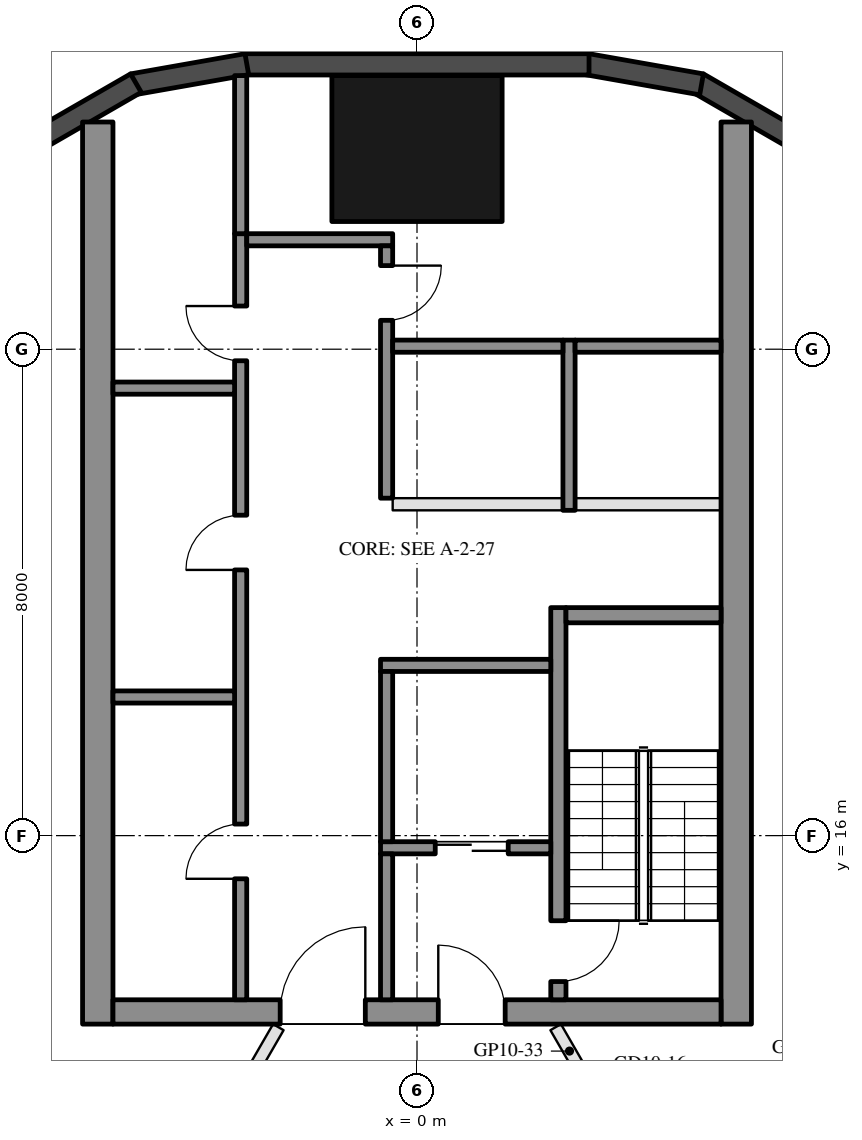
"""IFC4 building model, lengths in metres.
Left out: names, types, materials, properties, quantities, classifications, styles, units other than length and angle.
Written with IfcOpenShell. Run it as: python <this file> out.ifc"""

import sys

from ifc_helpers import new_model, si_unit, direction, frame, frame_2d, origin, origin_2d, place, context, subcontext, project, spatial, rectangle, hollow_rectangle, extrude, element, fill, save


model = new_model("IFC4")
c1 = context("Model", 3, precision=1e-05, world=origin(), true_north=direction((0.0, 1.0)))
c2 = subcontext(c1, "Body", "Model", "MODEL_VIEW")
j1 = project(units=[si_unit("LENGTHUNIT", "METRE"), si_unit("PLANEANGLEUNIT", "RADIAN")], contexts=[c1])
p1 = place(None, origin())
s1 = spatial("IfcSite", under=j1, at=p1, CompositionType="ELEMENT")
p2 = place(p1, origin())
s2 = spatial("IfcBuilding", under=s1, at=p2, CompositionType="ELEMENT")
p3 = place(p2, frame((0.0, 0.0, 120.5)))
s3 = spatial("IfcBuildingStorey", under=s2, at=p3, CompositionType="ELEMENT", Elevation=120.5)
p4 = place(p3, frame((0.0, 27.3, 0.0), z_axis=(0.0, 0.0, 1.0), x_axis=(1.0, 0.0, 0.0)))
e1 = element("IfcColumn", 1, at=p4, inside=s3, PredefinedType="COLUMN", context=c2, shape_type="SweptSolid", body=[
    extrude(hollow_rectangle(XDim=2.8, YDim=2.4, WallThickness=0.07, at=origin_2d()), origin(), (0.0, 0.0, 1.0), 3.7),
])
for number, where, z_axis, x_axis in (
    (2, (6.277, 27.422, 0.0), (0.0, 0.0, 1.0), (-0.866, 0.5, 0.0)),
    (3, (4.68, 28.356, 0.0), (0.0, 0.0, 1.0), (-0.985, 0.174, 0.0)),
):
    element("IfcWall", number, at=place(p3, frame(where, z_axis=z_axis, x_axis=x_axis)), inside=s3, PredefinedType="SOLIDWALL", context=c2, shape_type="SweptSolid", body=[
        extrude(rectangle(XDim=1.91, YDim=0.35, at=frame_2d((0.955, 0.0))), origin(), (0.0, 0.0, 1.0), 3.55),
    ])
p5 = place(p3, frame((2.829, 28.685, 0.0), z_axis=(0.0, 0.0, 1.0), x_axis=(-1.0, 0.0, 0.0)))
e4 = element("IfcWall", 4, at=p5, inside=s3, PredefinedType="SOLIDWALL", context=c2, shape_type="SweptSolid", body=[
    extrude(rectangle(XDim=5.658, YDim=0.35, at=frame_2d((2.829, 0.0))), origin(), (0.0, 0.0, 1.0), 3.55),
])
for number, where, z_axis, x_axis in (
    (5, (-2.799, 28.688, 0.0), (0.0, 0.0, 1.0), (-0.985, -0.174, 0.0)),
    (6, (-4.623, 28.377, 0.0), (0.0, 0.0, 1.0), (-0.866, -0.5, 0.0)),
):
    element("IfcWall", number, at=place(p3, frame(where, z_axis=z_axis, x_axis=x_axis)), inside=s3, PredefinedType="SOLIDWALL", context=c2, shape_type="SweptSolid", body=[
        extrude(rectangle(XDim=1.91, YDim=0.35, at=frame_2d((0.955, 0.0))), origin(), (0.0, 0.0, 1.0), 3.55),
    ])
for number, where, z_axis, x_axis in (
    (7, (5.25, 12.9, 0.0), (0.0, 0.0, 1.0), (0.0, 1.0, 0.0)),
    (8, (-5.25, 12.9, 0.0), (0.0, 0.0, 1.0), (0.0, 1.0, 0.0)),
):
    element("IfcWall", number, at=place(p3, frame(where, z_axis=z_axis, x_axis=x_axis)), inside=s3, PredefinedType="SHEAR", context=c2, shape_type="SweptSolid", body=[
        extrude(rectangle(XDim=14.837, YDim=0.5, at=frame_2d((7.418, 0.0))), origin(), (0.0, 0.0, 1.0), 3.5),
    ])
p6 = place(p3, frame((5.0, 13.1, 0.0), z_axis=(0.0, 0.0, 1.0), x_axis=(-1.0, 0.0, 0.0)))
e9 = element("IfcWall", 9, at=p6, inside=s3, PredefinedType="SHEAR", context=c2, shape_type="SweptSolid", body=[
    extrude(rectangle(XDim=10.0, YDim=0.4, at=frame_2d((5.0, 0.0))), origin(), (0.0, 0.0, 1.0), 3.5),
])
p7 = place(p6, frame((3.55, 0.0, 0.0)))
e10 = element("IfcOpeningElement", 10, at=p7, cuts=e9, PredefinedType="OPENING", context=c2, shape_type="SweptSolid", body=[
    extrude(rectangle(XDim=1.1, YDim=2.1, at=frame_2d((0.55, 1.05))), frame((0.0, 0.21, 0.0), z_axis=(0.0, -1.0, 0.0), x_axis=(1.0, 0.0, 0.0)), (0.0, 0.0, 1.0), 0.42),
])
p8 = place(p6, frame((5.85, 0.0, 0.0)))
e11 = element("IfcOpeningElement", 11, at=p8, cuts=e9, PredefinedType="OPENING", context=c2, shape_type="SweptSolid", body=[
    extrude(rectangle(XDim=1.4, YDim=2.1, at=frame_2d((0.7, 1.05))), frame((0.0, 0.21, 0.0), z_axis=(0.0, -1.0, 0.0), x_axis=(1.0, 0.0, 0.0)), (0.0, 0.0, 1.0), 0.42),
])
p9 = place(p3, frame((2.325, 13.3, 0.0), z_axis=(0.0, 0.0, 1.0), x_axis=(0.0, 1.0, 0.0)))
e12 = element("IfcWall", 12, at=p9, inside=s3, PredefinedType="SHEAR", context=c2, shape_type="SweptSolid", body=[
    extrude(rectangle(XDim=6.45, YDim=0.25, at=frame_2d((3.225, 0.0))), origin(), (0.0, 0.0, 1.0), 3.5),
])
p10 = place(p9, frame((0.3, 0.0, 0.0)))
e13 = element("IfcOpeningElement", 13, at=p10, cuts=e12, PredefinedType="OPENING", context=c2, shape_type="SweptSolid", body=[
    extrude(rectangle(XDim=1.0, YDim=2.1, at=frame_2d((0.5, 1.05))), frame((0.0, 0.135, 0.0), z_axis=(0.0, -1.0, 0.0), x_axis=(1.0, 0.0, 0.0)), (0.0, 0.0, 1.0), 0.27),
])
p11 = place(p3, frame((5.0, 19.625, 0.0), z_axis=(0.0, 0.0, 1.0), x_axis=(-1.0, 0.0, 0.0)))
e14 = element("IfcWall", 14, at=p11, inside=s3, PredefinedType="SHEAR", context=c2, shape_type="SweptSolid", body=[
    extrude(rectangle(XDim=2.55, YDim=0.25, at=frame_2d((1.275, 0.0))), origin(), (0.0, 0.0, 1.0), 3.5),
])
p12 = place(p3, frame((2.2, 18.8, 0.0), z_axis=(0.0, 0.0, 1.0), x_axis=(-1.0, 0.0, 0.0)))
e15 = element("IfcWall", 15, at=p12, inside=s3, PredefinedType="SHEAR", context=c2, shape_type="SweptSolid", body=[
    extrude(rectangle(XDim=2.8, YDim=0.2, at=frame_2d((1.4, 0.0))), origin(), (0.0, 0.0, 1.0), 3.5),
])
p13 = place(p3, frame((2.2, 15.8, 0.0), z_axis=(0.0, 0.0, 1.0), x_axis=(-1.0, 0.0, 0.0)))
e16 = element("IfcWall", 16, at=p13, inside=s3, PredefinedType="SHEAR", context=c2, shape_type="SweptSolid", body=[
    extrude(rectangle(XDim=2.8, YDim=0.2, at=frame_2d((1.4, 0.0))), origin(), (0.0, 0.0, 1.0), 3.5),
])
p14 = place(p13, frame((0.7, 0.0, 0.0)))
e17 = element("IfcOpeningElement", 17, at=p14, cuts=e16, PredefinedType="OPENING", context=c2, shape_type="SweptSolid", body=[
    extrude(rectangle(XDim=1.2, YDim=2.1, at=frame_2d((0.6, 1.05))), frame((0.0, 0.11, 0.0), z_axis=(0.0, -1.0, 0.0), x_axis=(1.0, 0.0, 0.0)), (0.0, 0.0, 1.0), 0.22),
])
p15 = place(p3, frame((-0.5, 15.9, 0.0), z_axis=(0.0, 0.0, 1.0), x_axis=(0.0, 1.0, 0.0)))
e18 = element("IfcWall", 18, at=p15, inside=s3, PredefinedType="SHEAR", context=c2, shape_type="SweptSolid", body=[
    extrude(rectangle(XDim=2.8, YDim=0.2, at=frame_2d((1.4, 0.0))), origin(), (0.0, 0.0, 1.0), 3.5),
])
p16 = place(p3, frame((-0.5, 13.3, 0.0), z_axis=(0.0, 0.0, 1.0), x_axis=(0.0, 1.0, 0.0)))
e19 = element("IfcWall", 19, at=p16, inside=s3, PredefinedType="SHEAR", context=c2, shape_type="SweptSolid", body=[
    extrude(rectangle(XDim=2.4, YDim=0.2, at=frame_2d((1.2, 0.0))), origin(), (0.0, 0.0, 1.0), 3.5),
])
p17 = place(p3, frame((-2.9, 13.3, 0.0), z_axis=(0.0, 0.0, 1.0), x_axis=(0.0, 1.0, 0.0)))
e20 = element("IfcWall", 20, at=p17, inside=s3, PredefinedType="SHEAR", context=c2, shape_type="SweptSolid", body=[
    extrude(rectangle(XDim=12.6, YDim=0.2, at=frame_2d((6.3, 0.0))), origin(), (0.0, 0.0, 1.0), 3.5),
])
p18 = place(p17, frame((1.99, 0.0, 0.0)))
e21 = element("IfcOpeningElement", 21, at=p18, cuts=e20, PredefinedType="OPENING", context=c2, shape_type="SweptSolid", body=[
    extrude(rectangle(XDim=0.9, YDim=2.1, at=frame_2d((0.45, 1.05))), frame((0.0, 0.11, 0.0), z_axis=(0.0, -1.0, 0.0), x_axis=(1.0, 0.0, 0.0)), (0.0, 0.0, 1.0), 0.22),
])
p19 = place(p17, frame((7.07, 0.0, 0.0)))
e22 = element("IfcOpeningElement", 22, at=p19, cuts=e20, PredefinedType="OPENING", context=c2, shape_type="SweptSolid", body=[
    extrude(rectangle(XDim=0.9, YDim=2.1, at=frame_2d((0.45, 1.05))), frame((0.0, 0.11, 0.0), z_axis=(0.0, -1.0, 0.0), x_axis=(1.0, 0.0, 0.0)), (0.0, 0.0, 1.0), 0.22),
])
p20 = place(p17, frame((10.51, 0.0, 0.0)))
e23 = element("IfcOpeningElement", 23, at=p20, cuts=e20, PredefinedType="OPENING", context=c2, shape_type="SweptSolid", body=[
    extrude(rectangle(XDim=0.9, YDim=2.1, at=frame_2d((0.45, 1.05))), frame((0.0, 0.11, 0.0), z_axis=(0.0, -1.0, 0.0), x_axis=(1.0, 0.0, 0.0)), (0.0, 0.0, 1.0), 0.22),
])
p21 = place(p3, frame((-0.4, 25.8, 0.0), z_axis=(0.0, 0.0, 1.0), x_axis=(-1.0, 0.0, 0.0)))
e24 = element("IfcWall", 24, at=p21, inside=s3, PredefinedType="SHEAR", context=c2, shape_type="SweptSolid", body=[
    extrude(rectangle(XDim=2.4, YDim=0.2, at=frame_2d((1.2, 0.0))), origin(), (0.0, 0.0, 1.0), 3.5),
])
p22 = place(p3, frame((-0.5, 21.55, 0.0), z_axis=(0.0, 0.0, 1.0), x_axis=(0.0, 1.0, 0.0)))
e25 = element("IfcWall", 25, at=p22, inside=s3, PredefinedType="SHEAR", context=c2, shape_type="SweptSolid", body=[
    extrude(rectangle(XDim=4.15, YDim=0.2, at=frame_2d((2.075, 0.0))), origin(), (0.0, 0.0, 1.0), 3.5),
])
p23 = place(p22, frame((2.925, 0.0, 0.0)))
e26 = element("IfcOpeningElement", 26, at=p23, cuts=e25, PredefinedType="OPENING", context=c2, shape_type="SweptSolid", body=[
    extrude(rectangle(XDim=0.9, YDim=2.1, at=frame_2d((0.45, 1.05))), frame((0.0, 0.11, 0.0), z_axis=(0.0, -1.0, 0.0), x_axis=(1.0, 0.0, 0.0)), (0.0, 0.0, 1.0), 0.22),
])
for number, where, z_axis, x_axis in (
    (27, (-3.0, 18.28, 0.0), (0.0, 0.0, 1.0), (-1.0, 0.0, 0.0)),
    (28, (-3.0, 23.36, 0.0), (0.0, 0.0, 1.0), (-1.0, 0.0, 0.0)),
):
    element("IfcWall", number, at=place(p3, frame(where, z_axis=z_axis, x_axis=x_axis)), inside=s3, PredefinedType="SHEAR", context=c2, shape_type="SweptSolid", body=[
        extrude(rectangle(XDim=2.0, YDim=0.2, at=frame_2d((1.0, 0.0))), origin(), (0.0, 0.0, 1.0), 3.5),
    ])
p24 = place(p3, frame((-2.9, 25.9, 0.0), z_axis=(0.0, 0.0, 1.0), x_axis=(0.0, 1.0, 0.0)))
e29 = element("IfcWall", 29, at=p24, inside=s3, PredefinedType="SHEAR", context=c2, shape_type="SweptSolid", body=[
    extrude(rectangle(XDim=2.6, YDim=0.2, at=frame_2d((1.3, 0.0))), origin(), (0.0, 0.0, 1.0), 3.5),
])
p25 = place(p3, frame((2.5, 21.35, 0.0), z_axis=(0.0, 0.0, 1.0), x_axis=(0.0, 1.0, 0.0)))
e30 = element("IfcWall", 30, at=p25, inside=s3, PredefinedType="SHEAR", context=c2, shape_type="SweptSolid", body=[
    extrude(rectangle(XDim=2.8, YDim=0.2, at=frame_2d((1.4, 0.0))), origin(), (0.0, 0.0, 1.0), 3.5),
])
p26 = place(p3, frame((5.0, 24.05, 0.0), z_axis=(0.0, 0.0, 1.0), x_axis=(-1.0, 0.0, 0.0)))
e31 = element("IfcWall", 31, at=p26, inside=s3, PredefinedType="SHEAR", context=c2, shape_type="SweptSolid", body=[
    extrude(rectangle(XDim=2.4, YDim=0.2, at=frame_2d((1.2, 0.0))), origin(), (0.0, 0.0, 1.0), 3.5),
])
p27 = place(p3, frame((2.4, 24.05, 0.0), z_axis=(0.0, 0.0, 1.0), x_axis=(-1.0, 0.0, 0.0)))
e32 = element("IfcWall", 32, at=p27, inside=s3, PredefinedType="SHEAR", context=c2, shape_type="SweptSolid", body=[
    extrude(rectangle(XDim=2.8, YDim=0.2, at=frame_2d((1.4, 0.0))), origin(), (0.0, 0.0, 1.0), 3.5),
])
p28 = place(p3, frame((5.0, 21.45, 0.0), z_axis=(0.0, 0.0, 1.0), x_axis=(-1.0, 0.0, 0.0)))
e33 = element("IfcWall", 33, at=p28, inside=s3, PredefinedType="PARTITIONING", context=c2, shape_type="SweptSolid", body=[
    extrude(rectangle(XDim=2.4, YDim=0.2, at=frame_2d((1.2, 0.0))), origin(), (0.0, 0.0, 1.0), 3.5),
])
p29 = place(p3, frame((2.4, 21.45, 0.0), z_axis=(0.0, 0.0, 1.0), x_axis=(-1.0, 0.0, 0.0)))
e34 = element("IfcWall", 34, at=p29, inside=s3, PredefinedType="PARTITIONING", context=c2, shape_type="SweptSolid", body=[
    extrude(rectangle(XDim=2.8, YDim=0.2, at=frame_2d((1.4, 0.0))), origin(), (0.0, 0.0, 1.0), 3.5),
])
p30 = place(p3, frame((13.647, 14.923, 0.0), z_axis=(0.0, 0.0, 1.0), x_axis=(-0.866027479907, -0.499996404033, 0.0)))
e35 = element("IfcWall", 35, at=p30, inside=s3, PredefinedType="PARTITIONING", context=c2, shape_type="SweptSolid", body=[
    extrude(rectangle(XDim=10.98, YDim=0.2, at=frame_2d((5.49, 0.0))), origin(), (0.0, 0.0, 1.0), 2.96),
])
p31 = place(p3, frame((-13.508, 13.363, 0.0), z_axis=(0.0, 0.0, 1.0), x_axis=(0.915297635711, -0.402778149932, 0.0)))
e36 = element("IfcWall", 36, at=p31, inside=s3, PredefinedType="PARTITIONING", context=c2, shape_type="SweptSolid", body=[
    extrude(rectangle(XDim=10.14, YDim=0.2, at=frame_2d((5.07, 0.0))), origin(), (0.0, 0.0, 1.0), 2.96),
])
p32 = place(p3, frame((14.522, 13.407, 0.0), z_axis=(0.0, 0.0, 1.0), x_axis=(-0.851781158383, -0.523897755506, 0.0)))
e37 = element("IfcWall", 37, at=p32, inside=s3, PredefinedType="PARTITIONING", context=c2, shape_type="SweptSolid", body=[
    extrude(rectangle(XDim=10.984, YDim=0.15, at=frame_2d((5.492, 0.0))), origin(), (0.0, 0.0, 1.0), 2.95),
])
p33 = place(p3, frame((2.281, 12.85, 0.0), z_axis=(0.0, 0.0, 1.0), x_axis=(0.499979074716, -0.866037484666, 0.0)))
e38 = element("IfcWall", 38, at=p33, inside=s3, PredefinedType="PARTITIONING", context=c2, shape_type="SweptSolid", body=[
    extrude(rectangle(XDim=3.788, YDim=0.2, at=frame_2d((1.894, 0.0))), origin(), (0.0, 0.0, 1.0), 2.95),
])
p34 = place(p33, frame((1.394, 0.0, 0.0)))
e39 = element("IfcOpeningElement", 39, at=p34, cuts=e38, PredefinedType="OPENING", context=c2, shape_type="SweptSolid", body=[
    extrude(rectangle(XDim=1.0, YDim=2.1, at=frame_2d((0.5, 1.05))), frame((0.0, 0.11, 0.0), z_axis=(0.0, -1.0, 0.0), x_axis=(1.0, 0.0, 0.0)), (0.0, 0.0, 1.0), 0.22),
])
p35 = place(p3, frame((-4.269, 9.406, 0.0), z_axis=(0.0, 0.0, 1.0), x_axis=(0.499968678846, 0.866043486306, 0.0)))
e40 = element("IfcWall", 40, at=p35, inside=s3, PredefinedType="PARTITIONING", context=c2, shape_type="SweptSolid", body=[
    extrude(rectangle(XDim=3.977, YDim=0.2, at=frame_2d((1.988, 0.0))), origin(), (0.0, 0.0, 1.0), 2.95),
])
p36 = place(p35, frame((1.488, 0.0, 0.0)))
e41 = element("IfcOpeningElement", 41, at=p36, cuts=e40, PredefinedType="OPENING", context=c2, shape_type="SweptSolid", body=[
    extrude(rectangle(XDim=1.0, YDim=2.1, at=frame_2d((0.5, 1.05))), frame((0.0, 0.11, 0.0), z_axis=(0.0, -1.0, 0.0), x_axis=(1.0, 0.0, 0.0)), (0.0, 0.0, 1.0), 0.22),
])
p37 = place(p14, origin())
e42 = element("IfcDoor", 42, at=p37, inside=s3, OperationType="DOUBLE_DOOR_SLIDING", PredefinedType="DOOR", context=c2, shape_type="SweptSolid", body=[
    extrude(rectangle(XDim=1.2, YDim=2.1, at=frame_2d((0.6, 1.05))), frame((0.0, 0.025, 0.0), z_axis=(0.0, -1.0, 0.0), x_axis=(1.0, 0.0, 0.0)), (0.0, 0.0, 1.0), 0.05),
])
fill(e17, e42)
p38 = place(p18, origin())
e43 = element("IfcDoor", 43, at=p38, inside=s3, OperationType="SINGLE_SWING_LEFT", PredefinedType="DOOR", context=c2, shape_type="SweptSolid", body=[
    extrude(rectangle(XDim=0.9, YDim=2.1, at=frame_2d((0.45, 1.05))), frame((0.0, 0.025, 0.0), z_axis=(0.0, -1.0, 0.0), x_axis=(1.0, 0.0, 0.0)), (0.0, 0.0, 1.0), 0.05),
])
fill(e21, e43)
p39 = place(p19, origin())
e44 = element("IfcDoor", 44, at=p39, inside=s3, OperationType="SINGLE_SWING_LEFT", PredefinedType="DOOR", context=c2, shape_type="SweptSolid", body=[
    extrude(rectangle(XDim=0.9, YDim=2.1, at=frame_2d((0.45, 1.05))), frame((0.0, 0.025, 0.0), z_axis=(0.0, -1.0, 0.0), x_axis=(1.0, 0.0, 0.0)), (0.0, 0.0, 1.0), 0.05),
])
fill(e22, e44)
p40 = place(p20, origin())
e45 = element("IfcDoor", 45, at=p40, inside=s3, OperationType="SINGLE_SWING_RIGHT", PredefinedType="DOOR", context=c2, shape_type="SweptSolid", body=[
    extrude(rectangle(XDim=0.9, YDim=2.1, at=frame_2d((0.45, 1.05))), frame((0.0, 0.025, 0.0), z_axis=(0.0, -1.0, 0.0), x_axis=(1.0, 0.0, 0.0)), (0.0, 0.0, 1.0), 0.05),
])
fill(e23, e45)
p41 = place(p23, frame((0.9, 0.0, 0.0), z_axis=(0.0, 0.0, 1.0), x_axis=(-1.0, 0.0, 0.0)))
e46 = element("IfcDoor", 46, at=p41, inside=s3, OperationType="SINGLE_SWING_LEFT", PredefinedType="DOOR", context=c2, shape_type="SweptSolid", body=[
    extrude(rectangle(XDim=0.9, YDim=2.1, at=frame_2d((0.45, 1.05))), frame((0.0, 0.025, 0.0), z_axis=(0.0, -1.0, 0.0), x_axis=(1.0, 0.0, 0.0)), (0.0, 0.0, 1.0), 0.05),
])
fill(e26, e46)
p42 = place(p7, frame((1.1, 0.0, 0.0), z_axis=(0.0, 0.0, 1.0), x_axis=(-1.0, 0.0, 0.0)))
e47 = element("IfcDoor", 47, at=p42, inside=s3, OperationType="SINGLE_SWING_LEFT", PredefinedType="DOOR", context=c2, shape_type="SweptSolid", body=[
    extrude(rectangle(XDim=1.1, YDim=2.1, at=frame_2d((0.55, 1.05))), frame((0.0, 0.025, 0.0), z_axis=(0.0, -1.0, 0.0), x_axis=(1.0, 0.0, 0.0)), (0.0, 0.0, 1.0), 0.05),
])
fill(e10, e47)
p43 = place(p8, frame((1.4, 0.0, 0.0), z_axis=(0.0, 0.0, 1.0), x_axis=(-1.0, 0.0, 0.0)))
e48 = element("IfcDoor", 48, at=p43, inside=s3, OperationType="DOUBLE_DOOR_SINGLE_SWING", PredefinedType="DOOR", context=c2, shape_type="SweptSolid", body=[
    extrude(rectangle(XDim=1.4, YDim=2.1, at=frame_2d((0.7, 1.05))), frame((0.0, 0.025, 0.0), z_axis=(0.0, -1.0, 0.0), x_axis=(1.0, 0.0, 0.0)), (0.0, 0.0, 1.0), 0.05),
])
fill(e11, e48)
p44 = place(p10, frame((1.0, 0.0, 0.0), z_axis=(0.0, 0.0, 1.0), x_axis=(-1.0, 0.0, 0.0)))
e49 = element("IfcDoor", 49, at=p44, inside=s3, OperationType="SINGLE_SWING_LEFT", PredefinedType="DOOR", context=c2, shape_type="SweptSolid", body=[
    extrude(rectangle(XDim=1.0, YDim=2.1, at=frame_2d((0.5, 1.05))), frame((0.0, 0.025, 0.0), z_axis=(0.0, -1.0, 0.0), x_axis=(1.0, 0.0, 0.0)), (0.0, 0.0, 1.0), 0.05),
])
fill(e13, e49)
save(model, sys.argv[1])
